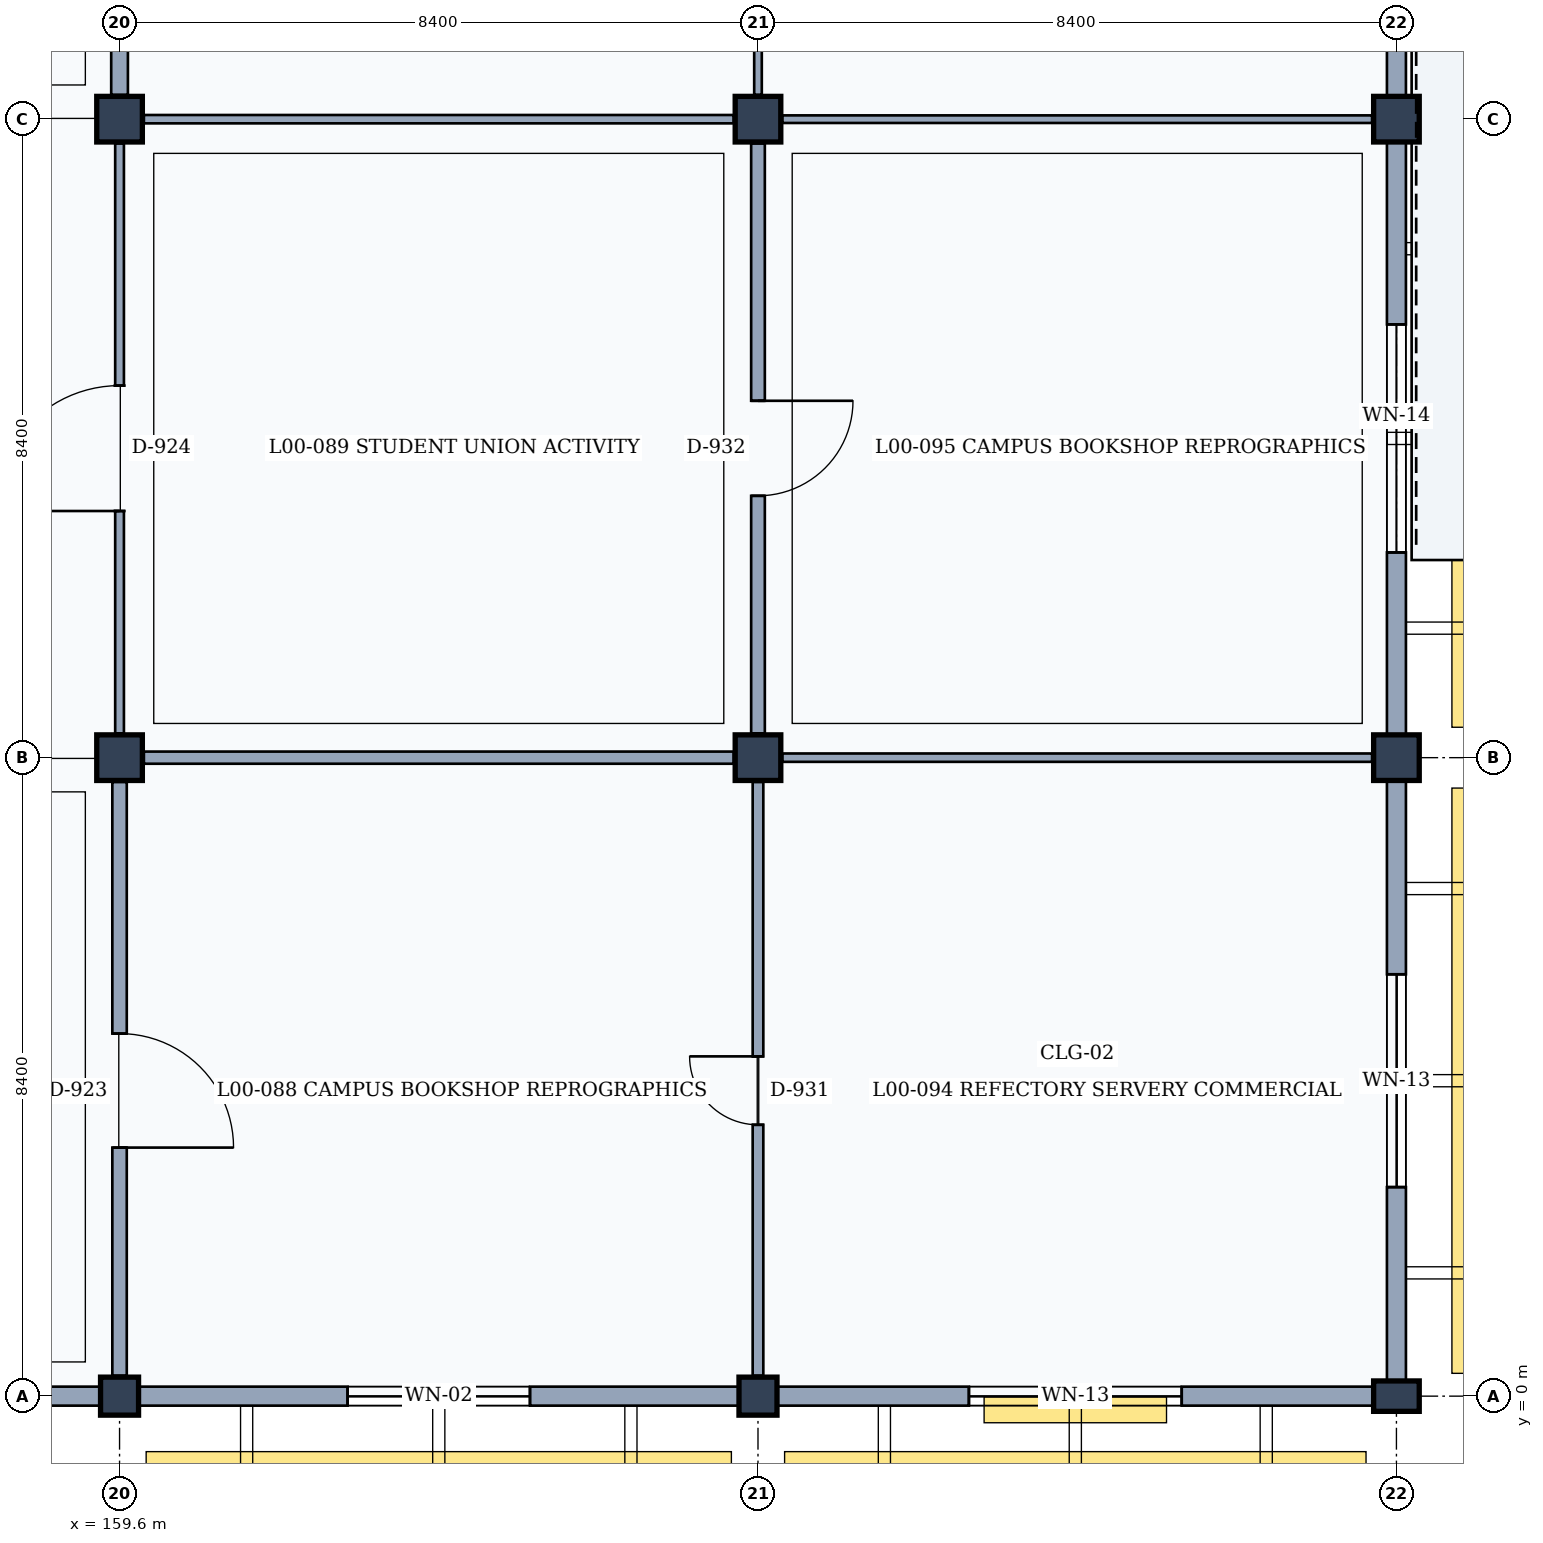
"""IFC4 building model, lengths in metres.
Left out: names, types, materials, properties, quantities, classifications, styles, units other than length and angle.
Written with IfcOpenShell. Run it as: python <this file> out.ifc"""

import sys

from ifc_helpers import new_model, si_unit, direction, frame, frame_2d, origin, origin_2d, place, context, subcontext, project, spatial, rectangle, extrude, element, fill, save


model = new_model("IFC4")
c1 = context("Model", 3, precision=1e-05, world=origin(), true_north=direction((0.0, 1.0)))
c2 = subcontext(c1, "Body", "Model", "MODEL_VIEW")
j1 = project(units=[si_unit("LENGTHUNIT", "METRE"), si_unit("PLANEANGLEUNIT", "RADIAN")], contexts=[c1])
p1 = place(None, origin())
s1 = spatial("IfcSite", under=j1, at=p1, CompositionType="ELEMENT")
p2 = place(p1, origin())
s2 = spatial("IfcBuilding", under=s1, at=p2, CompositionType="ELEMENT")
p3 = place(p2, origin())
s3 = spatial("IfcBuildingStorey", under=s2, at=p3, CompositionType="ELEMENT", Elevation=0.0)
p4 = place(p3, frame((159.6, 0.0, 0.0), z_axis=(0.0, 0.0, 1.0), x_axis=(1.0, 0.0, 0.0)))
e1 = element("IfcColumn", 1, at=p4, inside=s3, PredefinedType="COLUMN", context=c2, shape_type="SweptSolid", body=[
    extrude(rectangle(XDim=0.5, YDim=0.5, at=origin_2d()), origin(), (0.0, 0.0, 1.0), 4.8),
])
for number, where, z_axis, x_axis in (
    (2, (159.6, 8.4, 0.0), (0.0, 0.0, 1.0), (1.0, 0.0, 0.0)),
    (3, (159.6, 16.8, 0.0), (0.0, 0.0, 1.0), (1.0, 0.0, 0.0)),
):
    element("IfcColumn", number, at=place(p3, frame(where, z_axis=z_axis, x_axis=x_axis)), inside=s3, PredefinedType="COLUMN", context=c2, shape_type="SweptSolid", body=[
        extrude(rectangle(XDim=0.6, YDim=0.6, at=origin_2d()), origin(), (0.0, 0.0, 1.0), 4.8),
    ])
p5 = place(p3, frame((168.0, 0.0, 0.0), z_axis=(0.0, 0.0, 1.0), x_axis=(1.0, 0.0, 0.0)))
e4 = element("IfcColumn", 4, at=p5, inside=s3, PredefinedType="COLUMN", context=c2, shape_type="SweptSolid", body=[
    extrude(rectangle(XDim=0.5, YDim=0.5, at=origin_2d()), origin(), (0.0, 0.0, 1.0), 4.8),
])
for number, where, z_axis, x_axis in (
    (5, (168.0, 8.4, 0.0), (0.0, 0.0, 1.0), (1.0, 0.0, 0.0)),
    (6, (168.0, 16.8, 0.0), (0.0, 0.0, 1.0), (1.0, 0.0, 0.0)),
):
    element("IfcColumn", number, at=place(p3, frame(where, z_axis=z_axis, x_axis=x_axis)), inside=s3, PredefinedType="COLUMN", context=c2, shape_type="SweptSolid", body=[
        extrude(rectangle(XDim=0.6, YDim=0.6, at=origin_2d()), origin(), (0.0, 0.0, 1.0), 4.8),
    ])
p6 = place(p3, frame((176.4, 0.0, 0.0), z_axis=(0.0, 0.0, 1.0), x_axis=(1.0, 0.0, 0.0)))
e7 = element("IfcColumn", 7, at=p6, inside=s3, PredefinedType="PILASTER", context=c2, shape_type="SweptSolid", body=[
    extrude(rectangle(XDim=0.6, YDim=0.4, at=origin_2d()), origin(), (0.0, 0.0, 1.0), 4.8),
])
for number, where, z_axis, x_axis in (
    (8, (176.4, 8.4, 0.0), (0.0, 0.0, 1.0), (1.0, 0.0, 0.0)),
    (9, (176.4, 16.8, 0.0), (0.0, 0.0, 1.0), (1.0, 0.0, 0.0)),
):
    element("IfcColumn", number, at=place(p3, frame(where, z_axis=z_axis, x_axis=x_axis)), inside=s3, PredefinedType="COLUMN", context=c2, shape_type="SweptSolid", body=[
        extrude(rectangle(XDim=0.6, YDim=0.6, at=origin_2d()), origin(), (0.0, 0.0, 1.0), 4.8),
    ])
p7 = place(p3, frame((159.35, 0.0, 0.0), z_axis=(0.0, 0.0, 1.0), x_axis=(-1.0, 0.0, 0.0)))
e10 = element("IfcWall", 10, at=p7, inside=s3, PredefinedType="SOLIDWALL", context=c2, shape_type="SweptSolid", body=[
    extrude(rectangle(XDim=7.85, YDim=0.25, at=frame_2d((3.925, 0.0))), origin(), (0.0, 0.0, 1.0), 3.96),
])
p8 = place(p7, frame((3.025, 0.0, 0.0)))
e11 = element("IfcOpeningElement", 11, at=p8, cuts=e10, PredefinedType="OPENING", context=c2, shape_type="SweptSolid", body=[
    extrude(rectangle(XDim=1.8, YDim=2.2, at=frame_2d((0.9, 1.1))), frame((0.0, 0.135, 0.0), z_axis=(0.0, -1.0, 0.0), x_axis=(1.0, 0.0, 0.0)), (0.0, 0.0, 1.0), 0.27),
])
p9 = place(p3, frame((167.75, 0.0, 0.0), z_axis=(0.0, 0.0, 1.0), x_axis=(-1.0, 0.0, 0.0)))
e12 = element("IfcWall", 12, at=p9, inside=s3, PredefinedType="SOLIDWALL", context=c2, shape_type="SweptSolid", body=[
    extrude(rectangle(XDim=7.9, YDim=0.25, at=frame_2d((3.95, 0.0))), origin(), (0.0, 0.0, 1.0), 3.96),
])
p10 = place(p9, frame((2.75, 0.0, 0.95)))
e13 = element("IfcOpeningElement", 13, at=p10, cuts=e12, PredefinedType="OPENING", context=c2, shape_type="SweptSolid", body=[
    extrude(rectangle(XDim=2.4, YDim=1.8, at=frame_2d((1.2, 0.9))), frame((0.0, 0.135, 0.0), z_axis=(0.0, -1.0, 0.0), x_axis=(1.0, 0.0, 0.0)), (0.0, 0.0, 1.0), 0.27),
])
p11 = place(p3, frame((176.1, 0.0, 0.0), z_axis=(0.0, 0.0, 1.0), x_axis=(-1.0, 0.0, 0.0)))
e14 = element("IfcWall", 14, at=p11, inside=s3, PredefinedType="SOLIDWALL", context=c2, shape_type="SweptSolid", body=[
    extrude(rectangle(XDim=7.85, YDim=0.25, at=frame_2d((3.925, 0.0))), origin(), (0.0, 0.0, 1.0), 3.96),
])
p12 = place(p11, frame((2.525, 0.0, 0.95)))
e15 = element("IfcOpeningElement", 15, at=p12, cuts=e14, PredefinedType="OPENING", context=c2, shape_type="SweptSolid", body=[
    extrude(rectangle(XDim=2.8, YDim=1.65, at=frame_2d((1.4, 0.825))), frame((0.0, 0.135, 0.0), z_axis=(0.0, -1.0, 0.0), x_axis=(1.0, 0.0, 0.0)), (0.0, 0.0, 1.0), 0.27),
])
p13 = place(p3, frame((176.4, 8.1, 0.0), z_axis=(0.0, 0.0, 1.0), x_axis=(0.0, -1.0, 0.0)))
e16 = element("IfcWall", 16, at=p13, inside=s3, PredefinedType="SOLIDWALL", context=c2, shape_type="SweptSolid", body=[
    extrude(rectangle(XDim=7.9, YDim=0.25, at=frame_2d((3.95, 0.0))), origin(), (0.0, 0.0, 1.0), 3.96),
])
p14 = place(p13, frame((2.55, 0.0, 0.95)))
e17 = element("IfcOpeningElement", 17, at=p14, cuts=e16, PredefinedType="OPENING", context=c2, shape_type="SweptSolid", body=[
    extrude(rectangle(XDim=2.8, YDim=1.65, at=frame_2d((1.4, 0.825))), frame((0.0, 0.135, 0.0), z_axis=(0.0, -1.0, 0.0), x_axis=(1.0, 0.0, 0.0)), (0.0, 0.0, 1.0), 0.27),
])
p15 = place(p3, frame((176.4, 16.5, 0.0), z_axis=(0.0, 0.0, 1.0), x_axis=(0.0, -1.0, 0.0)))
e18 = element("IfcWall", 18, at=p15, inside=s3, PredefinedType="SOLIDWALL", context=c2, shape_type="SweptSolid", body=[
    extrude(rectangle(XDim=7.8, YDim=0.25, at=frame_2d((3.9, 0.0))), origin(), (0.0, 0.0, 1.0), 3.96),
])
p16 = place(p15, frame((2.4, 0.0, 0.95)))
e19 = element("IfcOpeningElement", 19, at=p16, cuts=e18, PredefinedType="OPENING", context=c2, shape_type="SweptSolid", body=[
    extrude(rectangle(XDim=3.0, YDim=1.8, at=frame_2d((1.5, 0.9))), frame((0.0, 0.135, 0.0), z_axis=(0.0, -1.0, 0.0), x_axis=(1.0, 0.0, 0.0)), (0.0, 0.0, 1.0), 0.27),
])
p17 = place(p3, frame((176.4, 24.9, 0.0), z_axis=(0.0, 0.0, 1.0), x_axis=(0.0, -1.0, 0.0)))
e20 = element("IfcWall", 20, at=p17, inside=s3, PredefinedType="SOLIDWALL", context=c2, shape_type="SweptSolid", body=[
    extrude(rectangle(XDim=7.8, YDim=0.25, at=frame_2d((3.9, 0.0))), origin(), (0.0, 0.0, 1.0), 3.96),
])
p18 = place(p17, frame((3.35, 0.0, 0.95)))
e21 = element("IfcOpeningElement", 21, at=p18, cuts=e20, PredefinedType="OPENING", context=c2, shape_type="SweptSolid", body=[
    extrude(rectangle(XDim=1.1, YDim=1.95, at=frame_2d((0.55, 0.975))), frame((0.0, 0.135, 0.0), z_axis=(0.0, -1.0, 0.0), x_axis=(1.0, 0.0, 0.0)), (0.0, 0.0, 1.0), 0.27),
])
p19 = place(p3, frame((159.6, 0.27, 0.0), z_axis=(0.0, 0.0, 1.0), x_axis=(0.0, 1.0, 0.0)))
e22 = element("IfcWall", 22, at=p19, inside=s3, PredefinedType="PARTITIONING", context=c2, shape_type="SweptSolid", body=[
    extrude(rectangle(XDim=7.81, YDim=0.19, at=frame_2d((3.905, 0.0))), origin(), (0.0, 0.0, 1.0), 3.92),
])
p20 = place(p19, frame((3.0, 0.0, 0.0)))
e23 = element("IfcOpeningElement", 23, at=p20, cuts=e22, PredefinedType="OPENING", context=c2, shape_type="SweptSolid", body=[
    extrude(rectangle(XDim=1.5, YDim=2.3, at=frame_2d((0.75, 1.15))), frame((0.0, 0.105, 0.0), z_axis=(0.0, -1.0, 0.0), x_axis=(1.0, 0.0, 0.0)), (0.0, 0.0, 1.0), 0.21),
])
p21 = place(p3, frame((159.6, 8.72, 0.0), z_axis=(0.0, 0.0, 1.0), x_axis=(0.0, 1.0, 0.0)))
e24 = element("IfcWall", 24, at=p21, inside=s3, PredefinedType="PARTITIONING", context=c2, shape_type="SweptSolid", body=[
    extrude(rectangle(XDim=7.76, YDim=0.115, at=frame_2d((3.88, 0.0))), origin(), (0.0, 0.0, 1.0), 3.92),
])
p22 = place(p21, frame((2.925, 0.0, 0.0)))
e25 = element("IfcOpeningElement", 25, at=p22, cuts=e24, PredefinedType="OPENING", context=c2, shape_type="SweptSolid", body=[
    extrude(rectangle(XDim=1.65, YDim=2.25, at=frame_2d((0.825, 1.125))), frame((0.0, 0.067, 0.0), z_axis=(0.0, -1.0, 0.0), x_axis=(1.0, 0.0, 0.0)), (0.0, 0.0, 1.0), 0.135),
])
p23 = place(p3, frame((159.6, 17.12, 0.0), z_axis=(0.0, 0.0, 1.0), x_axis=(0.0, 1.0, 0.0)))
e26 = element("IfcWall", 26, at=p23, inside=s3, PredefinedType="PARTITIONING", context=c2, shape_type="SweptSolid", body=[
    extrude(rectangle(XDim=7.635, YDim=0.22, at=frame_2d((3.817, 0.0))), origin(), (0.0, 0.0, 1.0), 3.92),
])
p24 = place(p23, frame((2.85, 0.0, 0.0)))
e27 = element("IfcOpeningElement", 27, at=p24, cuts=e26, PredefinedType="OPENING", context=c2, shape_type="SweptSolid", body=[
    extrude(rectangle(XDim=1.8, YDim=2.3, at=frame_2d((0.9, 1.15))), frame((0.0, 0.12, 0.0), z_axis=(0.0, -1.0, 0.0), x_axis=(1.0, 0.0, 0.0)), (0.0, 0.0, 1.0), 0.24),
])
p25 = place(p3, frame((168.0, 0.27, 0.0), z_axis=(0.0, 0.0, 1.0), x_axis=(0.0, 1.0, 0.0)))
e28 = element("IfcWall", 28, at=p25, inside=s3, PredefinedType="PARTITIONING", context=c2, shape_type="SweptSolid", body=[
    extrude(rectangle(XDim=7.81, YDim=0.14, at=frame_2d((3.905, 0.0))), origin(), (0.0, 0.0, 1.0), 3.92),
])
p26 = place(p25, frame((3.3, 0.0, 0.0)))
e29 = element("IfcOpeningElement", 29, at=p26, cuts=e28, PredefinedType="OPENING", context=c2, shape_type="SweptSolid", body=[
    extrude(rectangle(XDim=0.9, YDim=2.1, at=frame_2d((0.45, 1.05))), frame((0.0, 0.08, 0.0), z_axis=(0.0, -1.0, 0.0), x_axis=(1.0, 0.0, 0.0)), (0.0, 0.0, 1.0), 0.16),
])
p27 = place(p3, frame((159.92, 8.4, 0.0), z_axis=(0.0, 0.0, 1.0), x_axis=(1.0, 0.0, 0.0)))
e30 = element("IfcWall", 30, at=p27, inside=s3, PredefinedType="PARTITIONING", context=c2, shape_type="SweptSolid", body=[
    extrude(rectangle(XDim=7.76, YDim=0.16, at=frame_2d((3.88, 0.0))), origin(), (0.0, 0.0, 1.0), 3.85),
])
p28 = place(p3, frame((168.0, 8.72, 0.0), z_axis=(0.0, 0.0, 1.0), x_axis=(0.0, 1.0, 0.0)))
e31 = element("IfcWall", 31, at=p28, inside=s3, PredefinedType="PARTITIONING", context=c2, shape_type="SweptSolid", body=[
    extrude(rectangle(XDim=7.76, YDim=0.18, at=frame_2d((3.88, 0.0))), origin(), (0.0, 0.0, 1.0), 3.92),
])
p29 = place(p28, frame((3.125, 0.0, 0.0)))
e32 = element("IfcOpeningElement", 32, at=p29, cuts=e31, PredefinedType="OPENING", context=c2, shape_type="SweptSolid", body=[
    extrude(rectangle(XDim=1.25, YDim=2.3, at=frame_2d((0.625, 1.15))), frame((0.0, 0.1, 0.0), z_axis=(0.0, -1.0, 0.0), x_axis=(1.0, 0.0, 0.0)), (0.0, 0.0, 1.0), 0.2),
])
p30 = place(p3, frame((159.92, 16.8, 0.0), z_axis=(0.0, 0.0, 1.0), x_axis=(1.0, 0.0, 0.0)))
e33 = element("IfcWall", 33, at=p30, inside=s3, PredefinedType="PARTITIONING", context=c2, shape_type="SweptSolid", body=[
    extrude(rectangle(XDim=7.76, YDim=0.11, at=frame_2d((3.88, 0.0))), origin(), (0.0, 0.0, 1.0), 3.85),
])
p31 = place(p3, frame((168.0, 17.12, 0.0), z_axis=(0.0, 0.0, 1.0), x_axis=(0.0, 1.0, 0.0)))
e34 = element("IfcWall", 34, at=p31, inside=s3, PredefinedType="MOVABLE", context=c2, shape_type="SweptSolid", body=[
    extrude(rectangle(XDim=7.76, YDim=0.1, at=frame_2d((3.88, 0.0))), origin(), (0.0, 0.0, 1.0), 3.92),
])
p32 = place(p31, frame((2.85, 0.0, 0.0)))
e35 = element("IfcOpeningElement", 35, at=p32, cuts=e34, PredefinedType="OPENING", context=c2, shape_type="SweptSolid", body=[
    extrude(rectangle(XDim=1.8, YDim=2.3, at=frame_2d((0.9, 1.15))), frame((0.0, 0.06, 0.0), z_axis=(0.0, -1.0, 0.0), x_axis=(1.0, 0.0, 0.0)), (0.0, 0.0, 1.0), 0.12),
])
p33 = place(p3, frame((168.32, 8.4, 0.0), z_axis=(0.0, 0.0, 1.0), x_axis=(1.0, 0.0, 0.0)))
e36 = element("IfcWall", 36, at=p33, inside=s3, PredefinedType="PARTITIONING", context=c2, shape_type="SweptSolid", body=[
    extrude(rectangle(XDim=7.76, YDim=0.11, at=frame_2d((3.88, 0.0))), origin(), (0.0, 0.0, 1.0), 3.85),
])
p34 = place(p3, frame((168.32, 16.8, 0.0), z_axis=(0.0, 0.0, 1.0), x_axis=(1.0, 0.0, 0.0)))
e37 = element("IfcWall", 37, at=p34, inside=s3, PredefinedType="MOVABLE", context=c2, shape_type="SweptSolid", body=[
    extrude(rectangle(XDim=7.76, YDim=0.1, at=frame_2d((3.88, 0.0))), origin(), (0.0, 0.0, 1.0), 3.85),
])
p35 = place(p10, origin())
e38 = element("IfcWindow", 38, at=p35, inside=s3, PartitioningType="SINGLE_PANEL", PredefinedType="WINDOW", context=c2, shape_type="SweptSolid", body=[
    extrude(rectangle(XDim=2.4, YDim=1.8, at=frame_2d((1.2, 0.9))), frame((0.0, 0.03, 0.0), z_axis=(0.0, -1.0, 0.0), x_axis=(1.0, 0.0, 0.0)), (0.0, 0.0, 1.0), 0.06),
])
fill(e13, e38)
p36 = place(p12, origin())
e39 = element("IfcWindow", 39, at=p36, inside=s3, PartitioningType="SINGLE_PANEL", PredefinedType="WINDOW", context=c2, shape_type="SweptSolid", body=[
    extrude(rectangle(XDim=2.8, YDim=1.65, at=frame_2d((1.4, 0.825))), frame((0.0, 0.03, 0.0), z_axis=(0.0, -1.0, 0.0), x_axis=(1.0, 0.0, 0.0)), (0.0, 0.0, 1.0), 0.06),
])
fill(e15, e39)
p37 = place(p14, origin())
e40 = element("IfcWindow", 40, at=p37, inside=s3, PartitioningType="SINGLE_PANEL", PredefinedType="WINDOW", context=c2, shape_type="SweptSolid", body=[
    extrude(rectangle(XDim=2.8, YDim=1.65, at=frame_2d((1.4, 0.825))), frame((0.0, 0.03, 0.0), z_axis=(0.0, -1.0, 0.0), x_axis=(1.0, 0.0, 0.0)), (0.0, 0.0, 1.0), 0.06),
])
fill(e17, e40)
p38 = place(p16, origin())
e41 = element("IfcWindow", 41, at=p38, inside=s3, PartitioningType="SINGLE_PANEL", PredefinedType="WINDOW", context=c2, shape_type="SweptSolid", body=[
    extrude(rectangle(XDim=3.0, YDim=1.8, at=frame_2d((1.5, 0.9))), frame((0.0, 0.03, 0.0), z_axis=(0.0, -1.0, 0.0), x_axis=(1.0, 0.0, 0.0)), (0.0, 0.0, 1.0), 0.06),
])
fill(e19, e41)
p39 = place(p20, frame((1.5, 0.0, 0.0), z_axis=(0.0, 0.0, 1.0), x_axis=(-1.0, 0.0, 0.0)))
e42 = element("IfcDoor", 42, at=p39, inside=s3, OperationType="SINGLE_SWING_RIGHT", PredefinedType="DOOR", context=c2, shape_type="SweptSolid", body=[
    extrude(rectangle(XDim=1.5, YDim=2.3, at=frame_2d((0.75, 1.15))), frame((0.0, 0.025, 0.0), z_axis=(0.0, -1.0, 0.0), x_axis=(1.0, 0.0, 0.0)), (0.0, 0.0, 1.0), 0.05),
])
fill(e23, e42)
p40 = place(p22, origin())
e43 = element("IfcDoor", 43, at=p40, inside=s3, OperationType="SINGLE_SWING_LEFT", PredefinedType="DOOR", context=c2, shape_type="SweptSolid", body=[
    extrude(rectangle(XDim=1.65, YDim=2.25, at=frame_2d((0.825, 1.125))), frame((0.0, 0.025, 0.0), z_axis=(0.0, -1.0, 0.0), x_axis=(1.0, 0.0, 0.0)), (0.0, 0.0, 1.0), 0.05),
])
fill(e25, e43)
p41 = place(p26, origin())
e44 = element("IfcDoor", 44, at=p41, inside=s3, OperationType="SINGLE_SWING_RIGHT", PredefinedType="DOOR", context=c2, shape_type="SweptSolid", body=[
    extrude(rectangle(XDim=0.9, YDim=2.1, at=frame_2d((0.45, 1.05))), frame((0.0, 0.025, 0.0), z_axis=(0.0, -1.0, 0.0), x_axis=(1.0, 0.0, 0.0)), (0.0, 0.0, 1.0), 0.05),
])
fill(e29, e44)
p42 = place(p29, frame((1.25, 0.0, 0.0), z_axis=(0.0, 0.0, 1.0), x_axis=(-1.0, 0.0, 0.0)))
e45 = element("IfcDoor", 45, at=p42, inside=s3, OperationType="SINGLE_SWING_LEFT", PredefinedType="DOOR", context=c2, shape_type="SweptSolid", body=[
    extrude(rectangle(XDim=1.25, YDim=2.3, at=frame_2d((0.625, 1.15))), frame((0.0, 0.025, 0.0), z_axis=(0.0, -1.0, 0.0), x_axis=(1.0, 0.0, 0.0)), (0.0, 0.0, 1.0), 0.05),
])
fill(e32, e45)
save(model, sys.argv[1])
